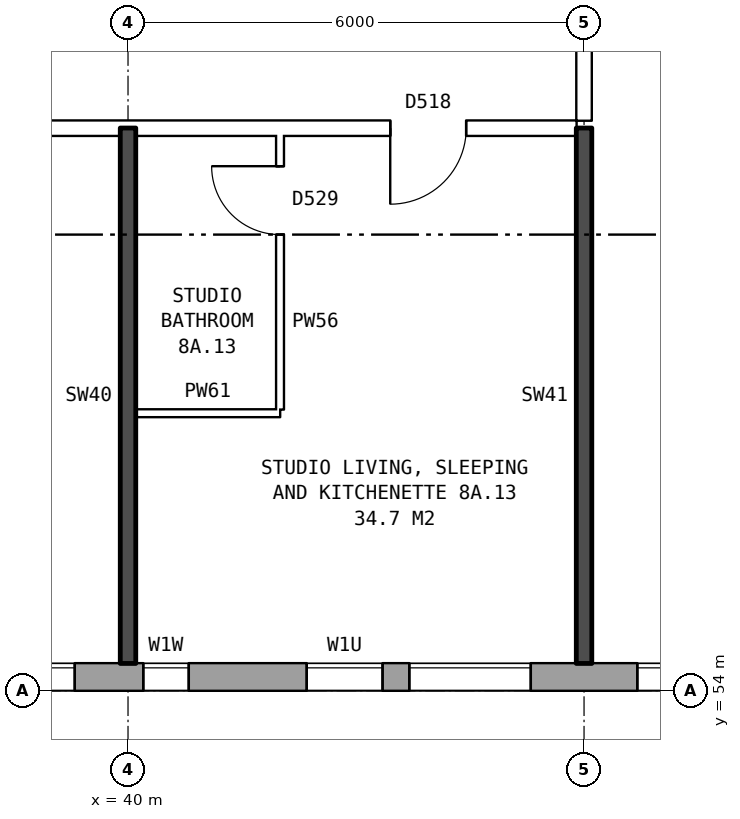
"""IFC4 building model, lengths in metres.
Left out: names, types, materials, properties, quantities, classifications, styles, units other than length and angle.
Written with IfcOpenShell. Run it as: python <this file> out.ifc"""

import sys

from ifc_helpers import new_model, si_unit, direction, frame, frame_2d, origin, place, context, subcontext, project, spatial, rectangle, extrude, element, fill, save


model = new_model("IFC4")
c1 = context("Model", 3, precision=1e-05, world=origin(), true_north=direction((0.0, 1.0)))
c2 = subcontext(c1, "Body", "Model", "MODEL_VIEW")
j1 = project(units=[si_unit("LENGTHUNIT", "METRE"), si_unit("PLANEANGLEUNIT", "RADIAN")], contexts=[c1])
p1 = place(None, origin())
s1 = spatial("IfcSite", under=j1, at=p1, CompositionType="ELEMENT")
p2 = place(p1, origin())
s2 = spatial("IfcBuilding", under=s1, at=p2, CompositionType="ELEMENT")
p3 = place(p2, frame((0.0, 0.0, 31.9)))
s3 = spatial("IfcBuildingStorey", under=s2, at=p3, CompositionType="ELEMENT", Elevation=31.9)
p4 = place(p3, frame((22.825, 54.18, 0.0), z_axis=(0.0, 0.0, 1.0), x_axis=(1.0, 0.0, 0.0)))
e1 = element("IfcWall", 1, at=p4, inside=s3, PredefinedType="STANDARD", context=c2, shape_type="SweptSolid", body=[
    extrude(rectangle(XDim=50.101, YDim=0.36, at=frame_2d((25.05, 0.0))), origin(), (0.0, 0.0, 1.0), 2.85),
])
p5 = place(p4, frame((2.875, 0.0, 0.8)))
e2 = element("IfcOpeningElement", 2, at=p5, cuts=e1, PredefinedType="OPENING", context=c2, shape_type="SweptSolid", body=[
    extrude(rectangle(XDim=1.6, YDim=1.8, at=frame_2d((0.8, 0.9))), frame((0.0, 0.19, 0.0), z_axis=(0.0, -1.0, 0.0), x_axis=(1.0, 0.0, 0.0)), (0.0, 0.0, 1.0), 0.38),
])
p6 = place(p4, frame((5.875, 0.0, 0.8)))
e3 = element("IfcOpeningElement", 3, at=p6, cuts=e1, PredefinedType="OPENING", context=c2, shape_type="SweptSolid", body=[
    extrude(rectangle(XDim=1.6, YDim=1.8, at=frame_2d((0.8, 0.9))), frame((0.0, 0.19, 0.0), z_axis=(0.0, -1.0, 0.0), x_axis=(1.0, 0.0, 0.0)), (0.0, 0.0, 1.0), 0.38),
])
p7 = place(p4, frame((8.875, 0.0, 0.8)))
e4 = element("IfcOpeningElement", 4, at=p7, cuts=e1, PredefinedType="OPENING", context=c2, shape_type="SweptSolid", body=[
    extrude(rectangle(XDim=1.6, YDim=1.8, at=frame_2d((0.8, 0.9))), frame((0.0, 0.19, 0.0), z_axis=(0.0, -1.0, 0.0), x_axis=(1.0, 0.0, 0.0)), (0.0, 0.0, 1.0), 0.38),
])
p8 = place(p4, frame((11.875, 0.0, 0.8)))
e5 = element("IfcOpeningElement", 5, at=p8, cuts=e1, PredefinedType="OPENING", context=c2, shape_type="SweptSolid", body=[
    extrude(rectangle(XDim=1.6, YDim=1.8, at=frame_2d((0.8, 0.9))), frame((0.0, 0.19, 0.0), z_axis=(0.0, -1.0, 0.0), x_axis=(1.0, 0.0, 0.0)), (0.0, 0.0, 1.0), 0.38),
])
p9 = place(p4, frame((14.875, 0.0, 0.8)))
e6 = element("IfcOpeningElement", 6, at=p9, cuts=e1, PredefinedType="OPENING", context=c2, shape_type="SweptSolid", body=[
    extrude(rectangle(XDim=1.6, YDim=1.8, at=frame_2d((0.8, 0.9))), frame((0.0, 0.19, 0.0), z_axis=(0.0, -1.0, 0.0), x_axis=(1.0, 0.0, 0.0)), (0.0, 0.0, 1.0), 0.38),
])
p10 = place(p4, frame((17.375, 0.0, 1.6)))
e7 = element("IfcOpeningElement", 7, at=p10, cuts=e1, PredefinedType="OPENING", context=c2, shape_type="SweptSolid", body=[
    extrude(rectangle(XDim=0.6, YDim=0.9, at=frame_2d((0.3, 0.45))), frame((0.0, 0.19, 0.0), z_axis=(0.0, -1.0, 0.0), x_axis=(1.0, 0.0, 0.0)), (0.0, 0.0, 1.0), 0.38),
])
p11 = place(p4, frame((20.875, 0.0, 0.8)))
e8 = element("IfcOpeningElement", 8, at=p11, cuts=e1, PredefinedType="OPENING", context=c2, shape_type="SweptSolid", body=[
    extrude(rectangle(XDim=1.6, YDim=1.8, at=frame_2d((0.8, 0.9))), frame((0.0, 0.19, 0.0), z_axis=(0.0, -1.0, 0.0), x_axis=(1.0, 0.0, 0.0)), (0.0, 0.0, 1.0), 0.38),
])
p12 = place(p4, frame((23.875, 0.0, 0.8)))
e9 = element("IfcOpeningElement", 9, at=p12, cuts=e1, PredefinedType="OPENING", context=c2, shape_type="SweptSolid", body=[
    extrude(rectangle(XDim=1.6, YDim=1.8, at=frame_2d((0.8, 0.9))), frame((0.0, 0.19, 0.0), z_axis=(0.0, -1.0, 0.0), x_axis=(1.0, 0.0, 0.0)), (0.0, 0.0, 1.0), 0.38),
])
p13 = place(p4, frame((26.875, 0.0, 0.8)))
e10 = element("IfcOpeningElement", 10, at=p13, cuts=e1, PredefinedType="OPENING", context=c2, shape_type="SweptSolid", body=[
    extrude(rectangle(XDim=1.6, YDim=1.8, at=frame_2d((0.8, 0.9))), frame((0.0, 0.19, 0.0), z_axis=(0.0, -1.0, 0.0), x_axis=(1.0, 0.0, 0.0)), (0.0, 0.0, 1.0), 0.38),
])
p14 = place(p4, frame((29.375, 0.0, 0.15)))
e11 = element("IfcOpeningElement", 11, at=p14, cuts=e1, PredefinedType="OPENING", context=c2, shape_type="SweptSolid", body=[
    extrude(rectangle(XDim=0.8, YDim=1.8, at=frame_2d((0.4, 0.9))), frame((0.0, 0.19, 0.0), z_axis=(0.0, -1.0, 0.0), x_axis=(1.0, 0.0, 0.0)), (0.0, 0.0, 1.0), 0.38),
])
p15 = place(p4, frame((32.425, 0.0, 1.4)))
e12 = element("IfcOpeningElement", 12, at=p15, cuts=e1, PredefinedType="OPENING", context=c2, shape_type="SweptSolid", body=[
    extrude(rectangle(XDim=0.6, YDim=1.2, at=frame_2d((0.3, 0.6))), frame((0.0, 0.19, 0.0), z_axis=(0.0, -1.0, 0.0), x_axis=(1.0, 0.0, 0.0)), (0.0, 0.0, 1.0), 0.38),
])
p16 = place(p4, frame((35.875, 0.0, 0.8)))
e13 = element("IfcOpeningElement", 13, at=p16, cuts=e1, PredefinedType="OPENING", context=c2, shape_type="SweptSolid", body=[
    extrude(rectangle(XDim=1.6, YDim=1.8, at=frame_2d((0.8, 0.9))), frame((0.0, 0.19, 0.0), z_axis=(0.0, -1.0, 0.0), x_axis=(1.0, 0.0, 0.0)), (0.0, 0.0, 1.0), 0.38),
])
p17 = place(p4, frame((38.875, 0.0, 0.8)))
e14 = element("IfcOpeningElement", 14, at=p17, cuts=e1, PredefinedType="OPENING", context=c2, shape_type="SweptSolid", body=[
    extrude(rectangle(XDim=1.6, YDim=1.8, at=frame_2d((0.8, 0.9))), frame((0.0, 0.19, 0.0), z_axis=(0.0, -1.0, 0.0), x_axis=(1.0, 0.0, 0.0)), (0.0, 0.0, 1.0), 0.38),
])
p18 = place(p4, frame((41.875, 0.0, 0.8)))
e15 = element("IfcOpeningElement", 15, at=p18, cuts=e1, PredefinedType="OPENING", context=c2, shape_type="SweptSolid", body=[
    extrude(rectangle(XDim=1.6, YDim=1.8, at=frame_2d((0.8, 0.9))), frame((0.0, 0.19, 0.0), z_axis=(0.0, -1.0, 0.0), x_axis=(1.0, 0.0, 0.0)), (0.0, 0.0, 1.0), 0.38),
])
p19 = place(p4, frame((44.875, 0.0, 0.8)))
e16 = element("IfcOpeningElement", 16, at=p19, cuts=e1, PredefinedType="OPENING", context=c2, shape_type="SweptSolid", body=[
    extrude(rectangle(XDim=1.6, YDim=1.8, at=frame_2d((0.8, 0.9))), frame((0.0, 0.19, 0.0), z_axis=(0.0, -1.0, 0.0), x_axis=(1.0, 0.0, 0.0)), (0.0, 0.0, 1.0), 0.38),
])
p20 = place(p4, frame((47.875, 0.0, 0.8)))
e17 = element("IfcOpeningElement", 17, at=p20, cuts=e1, PredefinedType="OPENING", context=c2, shape_type="SweptSolid", body=[
    extrude(rectangle(XDim=1.6, YDim=1.8, at=frame_2d((0.8, 0.9))), frame((0.0, 0.19, 0.0), z_axis=(0.0, -1.0, 0.0), x_axis=(1.0, 0.0, 0.0)), (0.0, 0.0, 1.0), 0.38),
])
p21 = place(p4, frame((19.525, 0.0, 0.8)))
e18 = element("IfcOpeningElement", 18, at=p21, cuts=e1, PredefinedType="OPENING", context=c2, shape_type="SweptSolid", body=[
    extrude(rectangle(XDim=1.0, YDim=0.9, at=frame_2d((0.5, 0.45))), frame((0.0, 0.19, 0.0), z_axis=(0.0, -1.0, 0.0), x_axis=(1.0, 0.0, 0.0)), (0.0, 0.0, 1.0), 0.38),
])
p22 = place(p4, frame((30.475, 0.0, 0.15)))
e19 = element("IfcOpeningElement", 19, at=p22, cuts=e1, PredefinedType="OPENING", context=c2, shape_type="SweptSolid", body=[
    extrude(rectangle(XDim=1.0, YDim=0.9, at=frame_2d((0.5, 0.45))), frame((0.0, 0.19, 0.0), z_axis=(0.0, -1.0, 0.0), x_axis=(1.0, 0.0, 0.0)), (0.0, 0.0, 1.0), 0.38),
])
p23 = place(p4, frame((33.325, 0.0, 0.8)))
e20 = element("IfcOpeningElement", 20, at=p23, cuts=e1, PredefinedType="OPENING", context=c2, shape_type="SweptSolid", body=[
    extrude(rectangle(XDim=1.6, YDim=1.8, at=frame_2d((0.8, 0.9))), frame((0.0, 0.19, 0.0), z_axis=(0.0, -1.0, 0.0), x_axis=(1.0, 0.0, 0.0)), (0.0, 0.0, 1.0), 0.38),
])
p24 = place(p3, frame((40.1, 57.65, 0.0), z_axis=(0.0, 0.0, 1.0), x_axis=(1.0, 0.0, 0.0)))
e21 = element("IfcWall", 21, at=p24, inside=s3, PredefinedType="PARTITIONING", context=c2, shape_type="SweptSolid", body=[
    extrude(rectangle(XDim=1.9, YDim=0.1, at=frame_2d((0.95, 0.0))), origin(), (0.0, 0.0, 1.0), 2.85),
])
p25 = place(p3, frame((20.11, 61.4, 0.0), z_axis=(0.0, 0.0, 1.0), x_axis=(1.0, 0.0, 0.0)))
e22 = element("IfcWall", 22, at=p25, inside=s3, PredefinedType="PARTITIONING", context=c2, shape_type="SweptSolid", body=[
    extrude(rectangle(XDim=25.79, YDim=0.2, at=frame_2d((12.895, 0.0))), origin(), (0.0, 0.0, 1.0), 2.85),
])
p26 = place(p25, frame((23.34, 0.0, 0.0)))
e23 = element("IfcOpeningElement", 23, at=p26, cuts=e22, PredefinedType="OPENING", context=c2, shape_type="SweptSolid", body=[
    extrude(rectangle(XDim=1.0, YDim=2.1, at=frame_2d((0.5, 1.05))), frame((0.0, 0.11, 0.0), z_axis=(0.0, -1.0, 0.0), x_axis=(1.0, 0.0, 0.0)), (0.0, 0.0, 1.0), 0.22),
])
p27 = place(p25, frame((17.39, 0.0, 0.0)))
e24 = element("IfcOpeningElement", 24, at=p27, cuts=e22, PredefinedType="OPENING", context=c2, shape_type="SweptSolid", body=[
    extrude(rectangle(XDim=1.0, YDim=2.1, at=frame_2d((0.5, 1.05))), frame((0.0, 0.11, 0.0), z_axis=(0.0, -1.0, 0.0), x_axis=(1.0, 0.0, 0.0)), (0.0, 0.0, 1.0), 0.22),
])
p28 = place(p25, frame((11.39, 0.0, 0.0)))
e25 = element("IfcOpeningElement", 25, at=p28, cuts=e22, PredefinedType="OPENING", context=c2, shape_type="SweptSolid", body=[
    extrude(rectangle(XDim=1.0, YDim=2.1, at=frame_2d((0.5, 1.05))), frame((0.0, 0.11, 0.0), z_axis=(0.0, -1.0, 0.0), x_axis=(1.0, 0.0, 0.0)), (0.0, 0.0, 1.0), 0.22),
])
p29 = place(p25, frame((2.245, 0.0, 0.0)))
e26 = element("IfcOpeningElement", 26, at=p29, cuts=e22, PredefinedType="OPENING", context=c2, shape_type="SweptSolid", body=[
    extrude(rectangle(XDim=1.0, YDim=2.1, at=frame_2d((0.5, 1.05))), frame((0.0, 0.11, 0.0), z_axis=(0.0, -1.0, 0.0), x_axis=(1.0, 0.0, 0.0)), (0.0, 0.0, 1.0), 0.22),
])
p30 = place(p3, frame((40.0, 54.36, 0.0), z_axis=(0.0, 0.0, 1.0), x_axis=(0.0, 1.0, 0.0)))
e27 = element("IfcWall", 27, at=p30, inside=s3, PredefinedType="SOLIDWALL", context=c2, shape_type="SweptSolid", body=[
    extrude(rectangle(XDim=7.04, YDim=0.2, at=frame_2d((3.52, 0.0))), origin(), (0.0, 0.0, 1.0), 2.85),
])
p31 = place(p3, frame((42.0, 57.7, 0.0), z_axis=(0.0, 0.0, 1.0), x_axis=(0.0, 1.0, 0.0)))
e28 = element("IfcWall", 28, at=p31, inside=s3, PredefinedType="PARTITIONING", context=c2, shape_type="SweptSolid", body=[
    extrude(rectangle(XDim=3.6, YDim=0.1, at=frame_2d((1.8, 0.0))), origin(), (0.0, 0.0, 1.0), 2.85),
])
p32 = place(p31, frame((2.3, 0.0, 0.0)))
e29 = element("IfcOpeningElement", 29, at=p32, cuts=e28, PredefinedType="OPENING", context=c2, shape_type="SweptSolid", body=[
    extrude(rectangle(XDim=0.9, YDim=2.1, at=frame_2d((0.45, 1.05))), frame((0.0, 0.06, 0.0), z_axis=(0.0, -1.0, 0.0), x_axis=(1.0, 0.0, 0.0)), (0.0, 0.0, 1.0), 0.12),
])
p33 = place(p3, frame((46.0, 54.36, 0.0), z_axis=(0.0, 0.0, 1.0), x_axis=(0.0, 1.0, 0.0)))
e30 = element("IfcWall", 30, at=p33, inside=s3, PredefinedType="SOLIDWALL", context=c2, shape_type="SweptSolid", body=[
    extrude(rectangle(XDim=7.04, YDim=0.2, at=frame_2d((3.52, 0.0))), origin(), (0.0, 0.0, 1.0), 2.85),
])
p34 = place(p3, frame((46.0, 61.5, 0.0), z_axis=(0.0, 0.0, 1.0), x_axis=(0.0, 1.0, 0.0)))
e31 = element("IfcWall", 31, at=p34, inside=s3, PredefinedType="PARTITIONING", context=c2, shape_type="SweptSolid", body=[
    extrude(rectangle(XDim=2.2, YDim=0.2, at=frame_2d((1.1, 0.0))), origin(), (0.0, 0.0, 1.0), 2.85),
])
p35 = place(p9, origin())
e32 = element("IfcWindow", 32, at=p35, inside=s3, PartitioningType="SINGLE_PANEL", PredefinedType="WINDOW", context=c2, shape_type="SweptSolid", body=[
    extrude(rectangle(XDim=1.6, YDim=1.8, at=frame_2d((0.8, 0.9))), frame((0.0, 0.15, 0.0), z_axis=(0.0, -1.0, 0.0), x_axis=(1.0, 0.0, 0.0)), (0.0, 0.0, 1.0), 0.06),
])
fill(e6, e32)
p36 = place(p10, origin())
e33 = element("IfcWindow", 33, at=p36, inside=s3, PartitioningType="SINGLE_PANEL", PredefinedType="WINDOW", context=c2, shape_type="SweptSolid", body=[
    extrude(rectangle(XDim=0.6, YDim=0.9, at=frame_2d((0.3, 0.45))), frame((0.0, 0.15, 0.0), z_axis=(0.0, -1.0, 0.0), x_axis=(1.0, 0.0, 0.0)), (0.0, 0.0, 1.0), 0.06),
])
fill(e7, e33)
p37 = place(p11, origin())
e34 = element("IfcWindow", 34, at=p37, inside=s3, PartitioningType="SINGLE_PANEL", PredefinedType="WINDOW", context=c2, shape_type="SweptSolid", body=[
    extrude(rectangle(XDim=1.6, YDim=1.8, at=frame_2d((0.8, 0.9))), frame((0.0, 0.15, 0.0), z_axis=(0.0, -1.0, 0.0), x_axis=(1.0, 0.0, 0.0)), (0.0, 0.0, 1.0), 0.06),
])
fill(e8, e34)
p38 = place(p12, origin())
e35 = element("IfcWindow", 35, at=p38, inside=s3, PartitioningType="SINGLE_PANEL", PredefinedType="WINDOW", context=c2, shape_type="SweptSolid", body=[
    extrude(rectangle(XDim=1.6, YDim=1.8, at=frame_2d((0.8, 0.9))), frame((0.0, 0.15, 0.0), z_axis=(0.0, -1.0, 0.0), x_axis=(1.0, 0.0, 0.0)), (0.0, 0.0, 1.0), 0.06),
])
fill(e9, e35)
p39 = place(p26, frame((1.0, 0.0, 0.0), z_axis=(0.0, 0.0, 1.0), x_axis=(-1.0, 0.0, 0.0)))
e36 = element("IfcDoor", 36, at=p39, inside=s3, OperationType="SINGLE_SWING_RIGHT", PredefinedType="DOOR", context=c2, shape_type="SweptSolid", body=[
    extrude(rectangle(XDim=1.0, YDim=2.1, at=frame_2d((0.5, 1.05))), frame((0.0, 0.025, 0.0), z_axis=(0.0, -1.0, 0.0), x_axis=(1.0, 0.0, 0.0)), (0.0, 0.0, 1.0), 0.05),
])
fill(e23, e36)
p40 = place(p32, origin())
e37 = element("IfcDoor", 37, at=p40, inside=s3, OperationType="SINGLE_SWING_RIGHT", PredefinedType="DOOR", context=c2, shape_type="SweptSolid", body=[
    extrude(rectangle(XDim=0.9, YDim=2.1, at=frame_2d((0.45, 1.05))), frame((0.0, 0.025, 0.0), z_axis=(0.0, -1.0, 0.0), x_axis=(1.0, 0.0, 0.0)), (0.0, 0.0, 1.0), 0.05),
])
fill(e29, e37)
p41 = place(p21, origin())
e38 = element("IfcWindow", 38, at=p41, inside=s3, PartitioningType="SINGLE_PANEL", PredefinedType="WINDOW", context=c2, shape_type="SweptSolid", body=[
    extrude(rectangle(XDim=1.0, YDim=0.9, at=frame_2d((0.5, 0.45))), frame((0.0, 0.15, 0.0), z_axis=(0.0, -1.0, 0.0), x_axis=(1.0, 0.0, 0.0)), (0.0, 0.0, 1.0), 0.06),
])
fill(e18, e38)
save(model, sys.argv[1])
